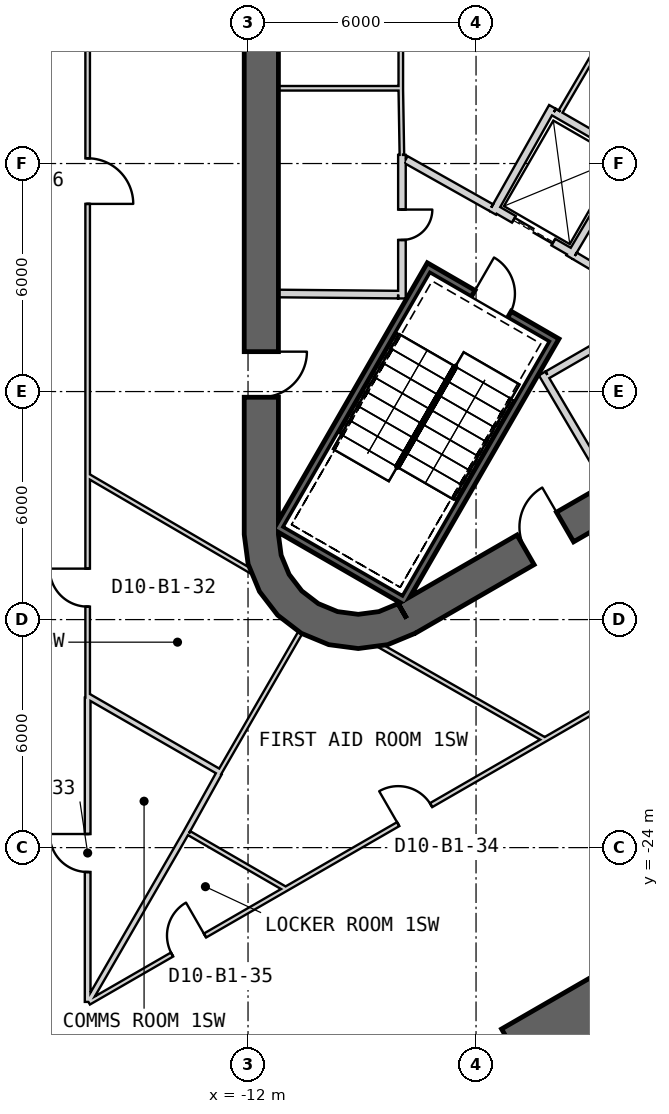
"""IFC4 building model, lengths in metres.
Left out: names, types, materials, properties, quantities, classifications, styles, units other than length and angle.
Written with IfcOpenShell. Run it as: python <this file> out.ifc"""

import sys

from ifc_helpers import new_model, si_unit, direction, frame, frame_2d, origin, place, context, subcontext, project, spatial, polyline, rectangle, outline, extrude, element, fill, save


model = new_model("IFC4")
c1 = context("Model", 3, precision=1e-05, world=origin(), true_north=direction((0.0, 1.0)))
c2 = subcontext(c1, "Body", "Model", "MODEL_VIEW")
j1 = project(units=[si_unit("LENGTHUNIT", "METRE"), si_unit("PLANEANGLEUNIT", "RADIAN")], contexts=[c1])
p1 = place(None, origin())
s1 = spatial("IfcSite", under=j1, at=p1, CompositionType="ELEMENT")
p2 = place(p1, origin())
s2 = spatial("IfcBuilding", under=s1, at=p2, CompositionType="ELEMENT")
p3 = place(p2, frame((0.0, 0.0, -5.5)))
s3 = spatial("IfcBuildingStorey", under=s2, at=p3, CompositionType="ELEMENT", Elevation=-5.5)
p4 = place(p3, frame((-11.65, 15.762, 0.0), z_axis=(0.0, 0.0, 1.0), x_axis=(0.0, -1.0, 0.0)))
e1 = element("IfcWall", 1, at=p4, inside=s3, PredefinedType="SHEAR", context=c2, shape_type="SweptSolid", body=[
    extrude(rectangle(XDim=31.523, YDim=0.9, at=frame_2d((15.762, 0.0))), origin(), (0.0, 0.0, 1.0), 5.5),
])
p5 = place(p4, frame((3.612, 0.0, 0.0)))
e2 = element("IfcOpeningElement", 2, at=p5, cuts=e1, PredefinedType="OPENING", context=c2, shape_type="SweptSolid", body=[
    extrude(rectangle(XDim=1.2, YDim=2.4, at=frame_2d((0.6, 1.2))), frame((0.0, 0.46, 0.0), z_axis=(0.0, -1.0, 0.0), x_axis=(1.0, 0.0, 0.0)), (0.0, 0.0, 1.0), 0.92),
])
p6 = place(p4, frame((26.712, 0.0, 0.0)))
e3 = element("IfcOpeningElement", 3, at=p6, cuts=e1, PredefinedType="OPENING", context=c2, shape_type="SweptSolid", body=[
    extrude(rectangle(XDim=1.2, YDim=2.4, at=frame_2d((0.6, 1.2))), frame((0.0, 0.46, 0.0), z_axis=(0.0, -1.0, 0.0), x_axis=(1.0, 0.0, 0.0)), (0.0, 0.0, 1.0), 0.92),
])
p7 = place(p3, frame((-7.825, -17.97, 0.0), z_axis=(0.0, 0.0, 1.0), x_axis=(0.866028369851, 0.499994862586, 0.0)))
e4 = element("IfcWall", 4, at=p7, inside=s3, PredefinedType="SHEAR", context=c2, shape_type="SweptSolid", body=[
    extrude(rectangle(XDim=31.523, YDim=0.9, at=frame_2d((15.762, 0.0))), origin(), (0.0, 0.0, 1.0), 5.5),
])
p8 = place(p7, frame((17.862, 0.0, 0.0)))
e5 = element("IfcOpeningElement", 5, at=p8, cuts=e4, PredefinedType="OPENING", context=c2, shape_type="SweptSolid", body=[
    extrude(rectangle(XDim=1.2, YDim=2.4, at=frame_2d((0.6, 1.2))), frame((0.0, 0.46, 0.0), z_axis=(0.0, -1.0, 0.0), x_axis=(1.0, 0.0, 0.0)), (0.0, 0.0, 1.0), 0.92),
])
p9 = place(p7, frame((20.562, 0.0, 0.0)))
e6 = element("IfcOpeningElement", 6, at=p9, cuts=e4, PredefinedType="OPENING", context=c2, shape_type="SweptSolid", body=[
    extrude(rectangle(XDim=1.2, YDim=2.4, at=frame_2d((0.6, 1.2))), frame((0.0, 0.46, 0.0), z_axis=(0.0, -1.0, 0.0), x_axis=(1.0, 0.0, 0.0)), (0.0, 0.0, 1.0), 0.92),
])
p10 = place(p7, frame((26.712, 0.0, 0.0)))
e7 = element("IfcOpeningElement", 7, at=p10, cuts=e4, PredefinedType="OPENING", context=c2, shape_type="SweptSolid", body=[
    extrude(rectangle(XDim=1.2, YDim=2.4, at=frame_2d((0.6, 1.2))), frame((0.0, 0.46, 0.0), z_axis=(0.0, -1.0, 0.0), x_axis=(1.0, 0.0, 0.0)), (0.0, 0.0, 1.0), 0.92),
])
p11 = place(p7, frame((3.612, 0.0, 0.0)))
e8 = element("IfcOpeningElement", 8, at=p11, cuts=e4, PredefinedType="OPENING", context=c2, shape_type="SweptSolid", body=[
    extrude(rectangle(XDim=1.2, YDim=2.4, at=frame_2d((0.6, 1.2))), frame((0.0, 0.46, 0.0), z_axis=(0.0, -1.0, 0.0), x_axis=(1.0, 0.0, 0.0)), (0.0, 0.0, 1.0), 0.92),
])
p12 = place(p3, origin())
e9 = element("IfcWall", 9, at=p12, inside=s3, PredefinedType="SHEAR", context=c2, shape_type="SweptSolid", body=[
    extrude(outline(polyline([(-12.1, -15.762), (-11.998, -16.538), (-11.698, -17.262), (-11.221, -17.883), (-10.6, -18.36), (-9.876, -18.659), (-9.1, -18.762), (-8.323, -18.659), (-7.6, -18.36), (-8.05, -17.58), (-8.556, -17.79), (-9.1, -17.862), (-9.644, -17.79), (-10.15, -17.58), (-10.585, -17.247), (-10.919, -16.812), (-11.128, -16.305), (-11.2, -15.762), (-12.1, -15.762)])), origin(), (0.0, 0.0, 1.0), 5.5),
])
p13 = place(p3, origin())
e10 = element("IfcWall", 10, at=p13, inside=s3, PredefinedType="SHEAR", context=c2, shape_type="SweptSolid", body=[
    extrude(outline(polyline([(-3.678, -31.63), (-0.214, -29.63), (-1.864, -26.772), (-5.328, -28.772), (-3.678, -31.63)])), origin(), (0.0, 0.0, 1.0), 5.5),
])
p14 = place(p3, frame((-3.905, -10.563, -0.4), z_axis=(0.0, 0.0, 1.0), x_axis=(-0.500012932018, -0.866017937352, 0.0)))
e11 = element("IfcWall", 11, at=p14, inside=s3, PredefinedType="SHEAR", context=c2, shape_type="SweptSolid", body=[
    extrude(rectangle(XDim=8.1, YDim=0.2, at=frame_2d((4.05, 0.0))), origin(), (0.0, 0.0, 1.0), 5.5),
])
p15 = place(p3, frame((-11.282, -15.541, -0.4), z_axis=(0.0, 0.0, 1.0), x_axis=(0.866000483506, -0.500043160704, 0.0)))
e12 = element("IfcWall", 12, at=p15, inside=s3, PredefinedType="SHEAR", context=c2, shape_type="SweptSolid", body=[
    extrude(rectangle(XDim=3.8, YDim=0.2, at=frame_2d((1.9, 0.0))), origin(), (0.0, 0.0, 1.0), 5.5),
])
p16 = place(p3, frame((-7.196, -8.663, -0.4), z_axis=(0.0, 0.0, 1.0), x_axis=(-0.499997992926, -0.866026562566, 0.0)))
e13 = element("IfcWall", 13, at=p16, inside=s3, PredefinedType="SHEAR", context=c2, shape_type="SweptSolid", body=[
    extrude(rectangle(XDim=7.9, YDim=0.2, at=frame_2d((3.95, 0.0))), origin(), (0.0, 0.0, 1.0), 5.5),
])
p17 = place(p3, frame((-4.041, -10.599, -0.4), z_axis=(0.0, 0.0, 1.0), x_axis=(-0.866047807691, 0.499961193289, 0.0)))
e14 = element("IfcWall", 14, at=p17, inside=s3, PredefinedType="SHEAR", context=c2, shape_type="SweptSolid", body=[
    extrude(rectangle(XDim=3.6, YDim=0.2, at=frame_2d((1.8, 0.0))), origin(), (0.0, 0.0, 1.0), 5.5),
])
p18 = place(p17, frame((1.25, 0.0, 0.4)))
e15 = element("IfcOpeningElement", 15, at=p18, cuts=e14, PredefinedType="OPENING", context=c2, shape_type="SweptSolid", body=[
    extrude(rectangle(XDim=1.1, YDim=2.1, at=frame_2d((0.55, 1.05))), frame((0.0, 0.11, 0.0), z_axis=(0.0, -1.0, 0.0), x_axis=(1.0, 0.0, 0.0)), (0.0, 0.0, 1.0), 0.22),
])
p19 = place(p3, frame((-3.446, -8.368, 0.0), z_axis=(0.0, 0.0, 1.0), x_axis=(-0.866024647952, 0.500001309137, 0.0)))
e16 = element("IfcWall", 16, at=p19, inside=s3, PredefinedType="PLUMBINGWALL", context=c2, shape_type="SweptSolid", body=[
    extrude(rectangle(XDim=2.4, YDim=0.2, at=frame_2d((1.2, 0.0))), origin(), (0.0, 0.0, 1.0), 5.1),
])
p20 = place(p19, frame((0.6, 0.0, 0.0)))
e17 = element("IfcOpeningElement", 17, at=p20, cuts=e16, PredefinedType="OPENING", context=c2, shape_type="SweptSolid", body=[
    extrude(rectangle(XDim=1.2, YDim=2.4, at=frame_2d((0.6, 1.2))), frame((0.0, 0.11, 0.0), z_axis=(0.0, -1.0, 0.0), x_axis=(1.0, 0.0, 0.0)), (0.0, 0.0, 1.0), 0.22),
])
p21 = place(p3, frame((-5.562, -7.296, 0.0), z_axis=(0.0, 0.0, 1.0), x_axis=(0.491358283181, 0.870957540612, 0.0)))
e18 = element("IfcWall", 18, at=p21, inside=s3, PredefinedType="PLUMBINGWALL", context=c2, shape_type="SweptSolid", body=[
    extrude(rectangle(XDim=3.2, YDim=0.2, at=frame_2d((1.6, 0.0))), origin(), (0.0, 0.0, 1.0), 5.1),
])
p22 = place(p3, frame((-3.953, -4.646, 0.0), z_axis=(0.0, 0.0, 1.0), x_axis=(0.866024647952, -0.500001309137, 0.0)))
e19 = element("IfcWall", 19, at=p22, inside=s3, PredefinedType="PLUMBINGWALL", context=c2, shape_type="SweptSolid", body=[
    extrude(rectangle(XDim=2.4, YDim=0.2, at=frame_2d((1.2, 0.0))), origin(), (0.0, 0.0, 1.0), 5.1),
])
p23 = place(p3, frame((-2.012, -5.882, 0.0), z_axis=(0.0, 0.0, 1.0), x_axis=(-0.508619639323, -0.860991325447, 0.0)))
e20 = element("IfcWall", 20, at=p23, inside=s3, PredefinedType="PLUMBINGWALL", context=c2, shape_type="SweptSolid", body=[
    extrude(rectangle(XDim=3.0, YDim=0.2, at=frame_2d((1.5, 0.0))), origin(), (0.0, 0.0, 1.0), 5.1),
])
p24 = place(p3, frame((-7.95, -9.55, 0.0), z_axis=(0.0, 0.0, 1.0), x_axis=(0.0, 1.0, 0.0)))
e21 = element("IfcWall", 21, at=p24, inside=s3, PredefinedType="PARTITIONING", context=c2, shape_type="SweptSolid", body=[
    extrude(rectangle(XDim=3.778, YDim=0.2, at=frame_2d((1.889, 0.0))), origin(), (0.0, 0.0, 1.0), 5.1),
])
p25 = place(p24, frame((1.539, 0.0, 0.0)))
e22 = element("IfcOpeningElement", 22, at=p25, cuts=e21, PredefinedType="OPENING", context=c2, shape_type="SweptSolid", body=[
    extrude(rectangle(XDim=0.8, YDim=2.1, at=frame_2d((0.4, 1.05))), frame((0.0, 0.11, 0.0), z_axis=(0.0, -1.0, 0.0), x_axis=(1.0, 0.0, 0.0)), (0.0, 0.0, 1.0), 0.22),
])
p26 = place(p3, frame((-11.2, -4.02, 0.0), z_axis=(0.0, 0.0, 1.0), x_axis=(1.0, 0.0, 0.0)))
e23 = element("IfcWall", 23, at=p26, inside=s3, PredefinedType="PARTITIONING", context=c2, shape_type="SweptSolid", body=[
    extrude(rectangle(XDim=3.25, YDim=0.12, at=frame_2d((1.625, 0.0))), origin(), (0.0, 0.0, 1.0), 5.1),
])
p27 = place(p3, frame((-7.98, 1.35, 0.0), z_axis=(0.0, 0.0, 1.0), x_axis=(0.0, -1.0, 0.0)))
e24 = element("IfcWall", 24, at=p27, inside=s3, PredefinedType="PARTITIONING", context=c2, shape_type="SweptSolid", body=[
    extrude(rectangle(XDim=5.4, YDim=0.12, at=frame_2d((2.7, 0.0))), origin(), (0.0, 0.0, 1.0), 5.1),
])
p28 = place(p27, frame((2.3, 0.0, 0.0)))
e25 = element("IfcOpeningElement", 25, at=p28, cuts=e24, PredefinedType="OPENING", context=c2, shape_type="SweptSolid", body=[
    extrude(rectangle(XDim=0.8, YDim=2.1, at=frame_2d((0.4, 1.05))), frame((0.0, 0.07, 0.0), z_axis=(0.0, -1.0, 0.0), x_axis=(1.0, 0.0, 0.0)), (0.0, 0.0, 1.0), 0.14),
])
p29 = place(p3, frame((-11.2, -9.42, 0.0), z_axis=(0.0, 0.0, 1.0), x_axis=(0.999957467379, -0.009222983926, 0.0)))
e26 = element("IfcWall", 26, at=p29, inside=s3, PredefinedType="PARTITIONING", context=c2, shape_type="SweptSolid", body=[
    extrude(rectangle(XDim=3.15, YDim=0.2, at=frame_2d((1.575, 0.0))), origin(), (0.0, 0.0, 1.0), 5.1),
])
p30 = place(p3, frame((-7.98, -4.05, 0.0), z_axis=(0.0, 0.0, 1.0), x_axis=(0.016723387416, -0.999860154378, 0.0)))
e27 = element("IfcWall", 27, at=p30, inside=s3, PredefinedType="PARTITIONING", context=c2, shape_type="SweptSolid", body=[
    extrude(rectangle(XDim=1.723, YDim=0.12, at=frame_2d((0.861, 0.0))), origin(), (0.0, 0.0, 1.0), 5.1),
])
p31 = place(p3, frame((-4.26, -11.524, 0.0), z_axis=(0.0, 0.0, 1.0), x_axis=(0.507997497166, -0.861358544901, 0.0)))
e28 = element("IfcWall", 28, at=p31, inside=s3, PredefinedType="PARTITIONING", context=c2, shape_type="SweptSolid", body=[
    extrude(rectangle(XDim=3.35, YDim=0.2, at=frame_2d((1.675, 0.0))), origin(), (0.0, 0.0, 1.0), 5.1),
])
p32 = place(p3, frame((-1.024, -9.771, 0.0), z_axis=(0.0, 0.0, 1.0), x_axis=(-0.866029903013, -0.499992207027, 0.0)))
e29 = element("IfcWall", 29, at=p32, inside=s3, PredefinedType="PARTITIONING", context=c2, shape_type="SweptSolid", body=[
    extrude(rectangle(XDim=3.578, YDim=0.2, at=frame_2d((1.789, 0.0))), origin(), (0.0, 0.0, 1.0), 5.1),
])
p33 = place(p3, frame((-7.85, -5.893, 0.0), z_axis=(0.0, 0.0, 1.0), x_axis=(0.871350695252, -0.490660744185, 0.0)))
e30 = element("IfcWall", 30, at=p33, inside=s3, PredefinedType="PARTITIONING", context=c2, shape_type="SweptSolid", body=[
    extrude(rectangle(XDim=2.582, YDim=0.2, at=frame_2d((1.291, 0.0))), origin(), (0.0, 0.0, 1.0), 5.1),
])
p34 = place(p3, frame((-3.401, -8.43, 0.0), z_axis=(0.0, 0.0, 1.0), x_axis=(0.860630814782, -0.509229418482, 0.0)))
e31 = element("IfcWall", 31, at=p34, inside=s3, PredefinedType="PARTITIONING", context=c2, shape_type="SweptSolid", body=[
    extrude(rectangle(XDim=2.582, YDim=0.2, at=frame_2d((1.291, 0.0))), origin(), (0.0, 0.0, 1.0), 5.1),
])
p35 = place(p34, frame((0.791, 0.0, 0.0)))
e32 = element("IfcOpeningElement", 32, at=p35, cuts=e31, PredefinedType="OPENING", context=c2, shape_type="SweptSolid", body=[
    extrude(rectangle(XDim=1.0, YDim=2.1, at=frame_2d((0.5, 1.05))), frame((0.0, 0.11, 0.0), z_axis=(0.0, -1.0, 0.0), x_axis=(1.0, 0.0, 0.0)), (0.0, 0.0, 1.0), 0.22),
])
p36 = place(p3, frame((-3.776, -4.633, 0.0), z_axis=(0.0, 0.0, 1.0), x_axis=(0.505505519663, 0.862823371027, 0.0)))
e33 = element("IfcWall", 33, at=p36, inside=s3, PredefinedType="PARTITIONING", context=c2, shape_type="SweptSolid", body=[
    extrude(rectangle(XDim=4.539, YDim=0.12, at=frame_2d((2.27, 0.0))), origin(), (0.0, 0.0, 1.0), 5.1),
])
p37 = place(p3, frame((-16.19, -28.077, 0.0), z_axis=(0.0, 0.0, 1.0), x_axis=(0.866271440356, 0.499573609816, 0.0)))
e34 = element("IfcWall", 34, at=p37, inside=s3, PredefinedType="PARTITIONING", context=c2, shape_type="SweptSolid", body=[
    extrude(rectangle(XDim=20.117, YDim=0.12, at=frame_2d((10.059, 0.0))), origin(), (0.0, 0.0, 1.0), 4.07),
])
p38 = place(p37, frame((9.397, 0.0, 0.0)))
e35 = element("IfcOpeningElement", 35, at=p38, cuts=e34, PredefinedType="OPENING", context=c2, shape_type="SweptSolid", body=[
    extrude(rectangle(XDim=1.0, YDim=2.1, at=frame_2d((0.5, 1.05))), frame((0.0, 0.07, 0.0), z_axis=(0.0, -1.0, 0.0), x_axis=(1.0, 0.0, 0.0)), (0.0, 0.0, 1.0), 0.14),
])
p39 = place(p37, frame((2.53, 0.0, 0.0)))
e36 = element("IfcOpeningElement", 36, at=p39, cuts=e34, PredefinedType="OPENING", context=c2, shape_type="SweptSolid", body=[
    extrude(rectangle(XDim=1.0, YDim=2.1, at=frame_2d((0.5, 1.05))), frame((0.0, 0.07, 0.0), z_axis=(0.0, -1.0, 0.0), x_axis=(1.0, 0.0, 0.0)), (0.0, 0.0, 1.0), 0.14),
])
p40 = place(p3, frame((-16.22, -20.053, 0.0), z_axis=(0.0, 0.0, 1.0), x_axis=(0.0, 1.0, 0.0)))
e37 = element("IfcWall", 37, at=p40, inside=s3, PredefinedType="PARTITIONING", context=c2, shape_type="SweptSolid", body=[
    extrude(rectangle(XDim=48.113, YDim=0.12, at=frame_2d((24.056, 0.0))), origin(), (0.0, 0.0, 1.0), 4.07),
])
p41 = place(p40, frame((12.991, 0.0, 0.0)))
e38 = element("IfcOpeningElement", 38, at=p41, cuts=e37, PredefinedType="OPENING", context=c2, shape_type="SweptSolid", body=[
    extrude(rectangle(XDim=1.2, YDim=2.4, at=frame_2d((0.6, 1.2))), frame((0.0, 0.07, 0.0), z_axis=(0.0, -1.0, 0.0), x_axis=(1.0, 0.0, 0.0)), (0.0, 0.0, 1.0), 0.14),
])
p42 = place(p40, frame((25.991, 0.0, 0.0)))
e39 = element("IfcOpeningElement", 39, at=p42, cuts=e37, PredefinedType="OPENING", context=c2, shape_type="SweptSolid", body=[
    extrude(rectangle(XDim=1.2, YDim=2.4, at=frame_2d((0.6, 1.2))), frame((0.0, 0.07, 0.0), z_axis=(0.0, -1.0, 0.0), x_axis=(1.0, 0.0, 0.0)), (0.0, 0.0, 1.0), 0.14),
])
p43 = place(p40, frame((36.515, 0.0, 0.0)))
e40 = element("IfcOpeningElement", 40, at=p43, cuts=e37, PredefinedType="OPENING", context=c2, shape_type="SweptSolid", body=[
    extrude(rectangle(XDim=0.9, YDim=2.1, at=frame_2d((0.45, 1.05))), frame((0.0, 0.07, 0.0), z_axis=(0.0, -1.0, 0.0), x_axis=(1.0, 0.0, 0.0)), (0.0, 0.0, 1.0), 0.14),
])
p44 = place(p40, frame((43.361, 0.0, 0.0)))
e41 = element("IfcOpeningElement", 41, at=p44, cuts=e37, PredefinedType="OPENING", context=c2, shape_type="SweptSolid", body=[
    extrude(rectangle(XDim=1.0, YDim=2.1, at=frame_2d((0.5, 1.05))), frame((0.0, 0.07, 0.0), z_axis=(0.0, -1.0, 0.0), x_axis=(1.0, 0.0, 0.0)), (0.0, 0.0, 1.0), 0.14),
])
p45 = place(p40, frame((2.394, 0.0, 0.0)))
e42 = element("IfcOpeningElement", 42, at=p45, cuts=e37, PredefinedType="OPENING", context=c2, shape_type="SweptSolid", body=[
    extrude(rectangle(XDim=1.0, YDim=2.1, at=frame_2d((0.5, 1.05))), frame((0.0, 0.07, 0.0), z_axis=(0.0, -1.0, 0.0), x_axis=(1.0, 0.0, 0.0)), (0.0, 0.0, 1.0), 0.14),
])
p46 = place(p3, frame((-16.22, -28.059, 0.0), z_axis=(0.0, 0.0, 1.0), x_axis=(0.0, 1.0, 0.0)))
e43 = element("IfcWall", 43, at=p46, inside=s3, PredefinedType="PLUMBINGWALL", context=c2, shape_type="SweptSolid", body=[
    extrude(rectangle(XDim=8.006, YDim=0.15, at=frame_2d((4.003, 0.0))), origin(), (0.0, 0.0, 1.0), 4.07),
])
p47 = place(p46, frame((3.417, 0.0, 0.0)))
e44 = element("IfcOpeningElement", 44, at=p47, cuts=e43, PredefinedType="OPENING", context=c2, shape_type="SweptSolid", body=[
    extrude(rectangle(XDim=1.0, YDim=2.1, at=frame_2d((0.5, 1.05))), frame((0.0, 0.085, 0.0), z_axis=(0.0, -1.0, 0.0), x_axis=(1.0, 0.0, 0.0)), (0.0, 0.0, 1.0), 0.17),
])
p48 = place(p3, frame((-8.707, -18.583, 0.0), z_axis=(0.0, 0.0, 1.0), x_axis=(0.868530929613, -0.495634970825, 0.0)))
e45 = element("IfcWall", 45, at=p48, inside=s3, PredefinedType="PARTITIONING", context=c2, shape_type="SweptSolid", body=[
    extrude(rectangle(XDim=5.166, YDim=0.12, at=frame_2d((2.583, 0.0))), origin(), (0.0, 0.0, 1.0), 4.18),
])
p49 = place(p3, frame((-16.2, -14.226, 0.0), z_axis=(0.0, 0.0, 1.0), x_axis=(0.863501067027, -0.504347010741, 0.0)))
e46 = element("IfcWall", 46, at=p49, inside=s3, PredefinedType="PARTITIONING", context=c2, shape_type="SweptSolid", body=[
    extrude(rectangle(XDim=5.166, YDim=0.12, at=frame_2d((2.583, 0.0))), origin(), (0.0, 0.0, 1.0), 4.18),
])
p50 = place(p3, frame((-16.2, -20.023, 0.0), z_axis=(0.0, 0.0, 1.0), x_axis=(0.866525298426, -0.499133155769, 0.0)))
e47 = element("IfcWall", 47, at=p50, inside=s3, PredefinedType="PLUMBINGWALL", context=c2, shape_type="SweptSolid", body=[
    extrude(rectangle(XDim=4.018, YDim=0.15, at=frame_2d((2.009, 0.0))), origin(), (0.0, 0.0, 1.0), 4.07),
])
p51 = place(p3, frame((-10.549, -18.212, 0.0), z_axis=(0.0, 0.0, 1.0), x_axis=(-0.500006121477, -0.866021869519, 0.0)))
e48 = element("IfcWall", 48, at=p51, inside=s3, PredefinedType="PARTITIONING", context=c2, shape_type="SweptSolid", body=[
    extrude(rectangle(XDim=4.42, YDim=0.12, at=frame_2d((2.21, 0.0))), origin(), (0.0, 0.0, 1.0), 4.07),
])
p52 = place(p3, frame((-12.759, -22.04, 0.0), z_axis=(0.0, 0.0, 1.0), x_axis=(-0.485722500315, -0.874113066306, 0.0)))
e49 = element("IfcWall", 49, at=p52, inside=s3, PredefinedType="PLUMBINGWALL", context=c2, shape_type="SweptSolid", body=[
    extrude(rectangle(XDim=1.823, YDim=0.15, at=frame_2d((0.912, 0.0))), origin(), (0.0, 0.0, 1.0), 4.07),
])
p53 = place(p3, frame((-16.2, -28.059, 0.0), z_axis=(0.0, 0.0, 1.0), x_axis=(0.499979710414, 0.866037117665, 0.0)))
e50 = element("IfcWall", 50, at=p53, inside=s3, PredefinedType="PLUMBINGWALL", context=c2, shape_type="SweptSolid", body=[
    extrude(rectangle(XDim=5.23, YDim=0.15, at=frame_2d((2.615, 0.0))), origin(), (0.0, 0.0, 1.0), 4.07),
])
p54 = place(p3, frame((-13.55, -23.619, 0.0), z_axis=(0.0, 0.0, 1.0), x_axis=(0.865340043372, -0.501185204627, 0.0)))
e51 = element("IfcWall", 51, at=p54, inside=s3, PredefinedType="PARTITIONING", context=c2, shape_type="SweptSolid", body=[
    extrude(rectangle(XDim=2.908, YDim=0.12, at=frame_2d((1.454, 0.0))), origin(), (0.0, 0.0, 1.0), 4.07),
])
p55 = place(p18, origin())
e52 = element("IfcDoor", 52, at=p55, inside=s3, OperationType="SINGLE_SWING_RIGHT", PredefinedType="USERDEFINED", context=c2, shape_type="SweptSolid", body=[
    extrude(rectangle(XDim=1.1, YDim=2.1, at=frame_2d((0.55, 1.05))), frame((0.0, 0.025, 0.0), z_axis=(0.0, -1.0, 0.0), x_axis=(1.0, 0.0, 0.0)), (0.0, 0.0, 1.0), 0.05),
])
fill(e15, e52)
p56 = place(p20, origin())
e53 = element("IfcDoor", 53, at=p56, inside=s3, OperationType="SLIDING_TO_LEFT", PredefinedType="USERDEFINED", context=c2, shape_type="SweptSolid", body=[
    extrude(rectangle(XDim=1.2, YDim=2.4, at=frame_2d((0.6, 1.2))), frame((0.0, 0.025, 0.0), z_axis=(0.0, -1.0, 0.0), x_axis=(1.0, 0.0, 0.0)), (0.0, 0.0, 1.0), 0.05),
])
fill(e17, e53)
p57 = place(p25, origin())
e54 = element("IfcDoor", 54, at=p57, inside=s3, OperationType="SINGLE_SWING_RIGHT", PredefinedType="USERDEFINED", context=c2, shape_type="SweptSolid", body=[
    extrude(rectangle(XDim=0.8, YDim=2.1, at=frame_2d((0.4, 1.05))), frame((0.0, 0.025, 0.0), z_axis=(0.0, -1.0, 0.0), x_axis=(1.0, 0.0, 0.0)), (0.0, 0.0, 1.0), 0.05),
])
fill(e22, e54)
p58 = place(p41, origin())
e55 = element("IfcDoor", 55, at=p58, inside=s3, OperationType="SINGLE_SWING_LEFT", PredefinedType="USERDEFINED", context=c2, shape_type="SweptSolid", body=[
    extrude(rectangle(XDim=1.2, YDim=2.4, at=frame_2d((0.6, 1.2))), frame((0.0, 0.025, 0.0), z_axis=(0.0, -1.0, 0.0), x_axis=(1.0, 0.0, 0.0)), (0.0, 0.0, 1.0), 0.05),
])
fill(e38, e55)
p59 = place(p45, origin())
e56 = element("IfcDoor", 56, at=p59, inside=s3, OperationType="SINGLE_SWING_RIGHT", PredefinedType="NOTDEFINED", context=c2, shape_type="SweptSolid", body=[
    extrude(rectangle(XDim=1.0, YDim=2.1, at=frame_2d((0.5, 1.05))), frame((0.0, 0.025, 0.0), z_axis=(0.0, -1.0, 0.0), x_axis=(1.0, 0.0, 0.0)), (0.0, 0.0, 1.0), 0.05),
])
fill(e42, e56)
p60 = place(p47, origin())
e57 = element("IfcDoor", 57, at=p60, inside=s3, OperationType="SINGLE_SWING_RIGHT", PredefinedType="USERDEFINED", context=c2, shape_type="SweptSolid", body=[
    extrude(rectangle(XDim=1.0, YDim=2.1, at=frame_2d((0.5, 1.05))), frame((0.0, 0.025, 0.0), z_axis=(0.0, -1.0, 0.0), x_axis=(1.0, 0.0, 0.0)), (0.0, 0.0, 1.0), 0.05),
])
fill(e44, e57)
p61 = place(p38, origin())
e58 = element("IfcDoor", 58, at=p61, inside=s3, OperationType="SINGLE_SWING_LEFT", PredefinedType="NOTDEFINED", context=c2, shape_type="SweptSolid", body=[
    extrude(rectangle(XDim=1.0, YDim=2.1, at=frame_2d((0.5, 1.05))), frame((0.0, 0.025, 0.0), z_axis=(0.0, -1.0, 0.0), x_axis=(1.0, 0.0, 0.0)), (0.0, 0.0, 1.0), 0.05),
])
fill(e35, e58)
p62 = place(p39, origin())
e59 = element("IfcDoor", 59, at=p62, inside=s3, OperationType="SINGLE_SWING_RIGHT", PredefinedType="NOTDEFINED", context=c2, shape_type="SweptSolid", body=[
    extrude(rectangle(XDim=1.0, YDim=2.1, at=frame_2d((0.5, 1.05))), frame((0.0, 0.025, 0.0), z_axis=(0.0, -1.0, 0.0), x_axis=(1.0, 0.0, 0.0)), (0.0, 0.0, 1.0), 0.05),
])
fill(e36, e59)
p63 = place(p6, origin())
e60 = element("IfcDoor", 60, at=p63, inside=s3, OperationType="SINGLE_SWING_LEFT", PredefinedType="USERDEFINED", context=c2, shape_type="SweptSolid", body=[
    extrude(rectangle(XDim=1.2, YDim=2.4, at=frame_2d((0.6, 1.2))), frame((0.0, 0.025, 0.0), z_axis=(0.0, -1.0, 0.0), x_axis=(1.0, 0.0, 0.0)), (0.0, 0.0, 1.0), 0.05),
])
fill(e3, e60)
p64 = place(p11, origin())
e61 = element("IfcDoor", 61, at=p64, inside=s3, OperationType="SINGLE_SWING_RIGHT", PredefinedType="USERDEFINED", context=c2, shape_type="SweptSolid", body=[
    extrude(rectangle(XDim=1.2, YDim=2.4, at=frame_2d((0.6, 1.2))), frame((0.0, 0.025, 0.0), z_axis=(0.0, -1.0, 0.0), x_axis=(1.0, 0.0, 0.0)), (0.0, 0.0, 1.0), 0.05),
])
fill(e8, e61)
save(model, sys.argv[1])
